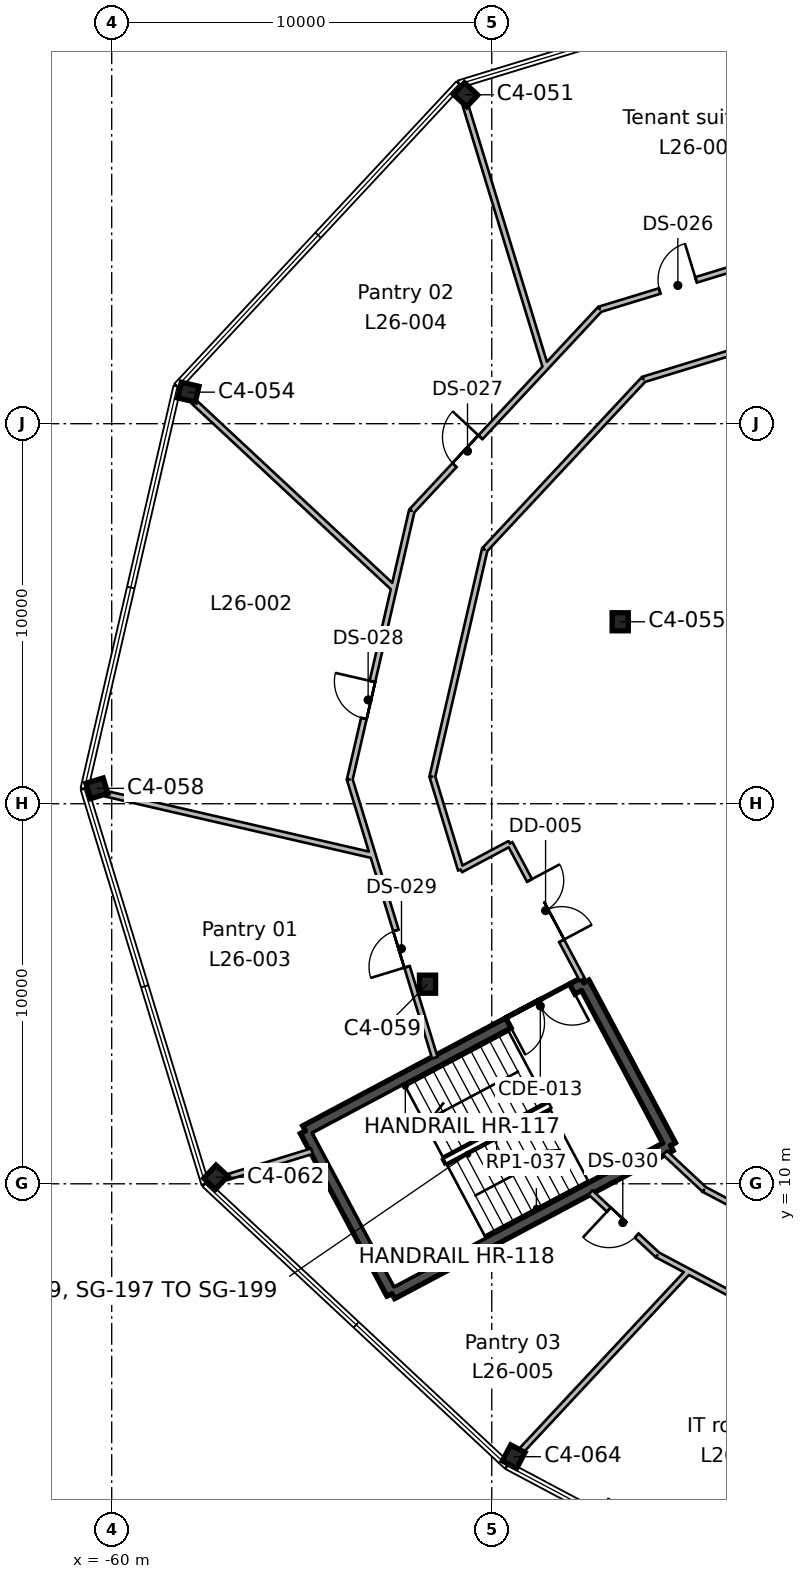
"""IFC4 building model, lengths in metres.
Left out: names, types, materials, properties, quantities, classifications, styles, units other than length and angle.
Written with IfcOpenShell. Run it as: python <this file> out.ifc"""

import sys

from ifc_helpers import new_model, si_unit, direction, frame, frame_2d, origin, origin_2d, place, context, subcontext, project, spatial, rectangle, i_section, extrude, element, fill, save


model = new_model("IFC4")
c1 = context("Model", 3, precision=1e-05, world=origin(), true_north=direction((0.0, 1.0)))
c2 = subcontext(c1, "Body", "Model", "MODEL_VIEW")
j1 = project(units=[si_unit("LENGTHUNIT", "METRE"), si_unit("PLANEANGLEUNIT", "RADIAN")], contexts=[c1])
p1 = place(None, origin())
s1 = spatial("IfcSite", under=j1, at=p1, CompositionType="ELEMENT")
p2 = place(p1, origin())
s2 = spatial("IfcBuilding", under=s1, at=p2, CompositionType="ELEMENT")
p3 = place(p2, frame((0.0, 0.0, 130.2)))
s3 = spatial("IfcBuildingStorey", under=s2, at=p3, CompositionType="ELEMENT", Elevation=130.2)
for number, where, z_axis, x_axis in (
    (1, (-49.423, 2.82, 0.0), (0.0, 0.0, 1.0), (0.883, -0.469, 0.0)),
    (2, (-57.262, 10.173, 0.0), (0.0, 0.0, 1.0), (0.731, -0.682, 0.0)),
    (3, (-51.69, 15.252, 0.0), (0.0, 0.0, 1.0), (1.0, 0.0, 0.0)),
    (4, (-60.39, 20.405, 0.0), (0.0, 0.0, 1.0), (0.292, -0.956, 0.0)),
    (5, (-46.62, 24.788, 0.0), (0.0, 0.0, 1.0), (1.0, 0.0, 0.0)),
    (6, (-57.983, 30.83, 0.0), (0.0, 0.0, 1.0), (-0.225, -0.974, 0.0)),
    (7, (-50.686, 38.655, 0.0), (0.0, 0.0, 1.0), (-0.682, -0.731, 0.0)),
):
    element("IfcColumn", number, at=place(p3, frame(where, z_axis=z_axis, x_axis=x_axis)), inside=s3, PredefinedType="COLUMN", context=c2, shape_type="SweptSolid", body=[
        extrude(i_section(OverallWidth=0.424, OverallDepth=0.475, WebThickness=0.048, FlangeThickness=0.077, FilletRadius=0.015, at=origin_2d()), origin(), (0.0, 0.0, 1.0), 4.0),
    ])
p4 = place(p3, frame((-47.574, 15.29, 0.0), z_axis=(0.0, 0.0, 1.0), x_axis=(0.469443498566, -0.882962514297, 0.0)))
e8 = element("IfcWall", 8, at=p4, inside=s3, PredefinedType="SHEAR", context=c2, shape_type="SweptSolid", body=[
    extrude(rectangle(XDim=4.85, YDim=0.3, at=frame_2d((2.425, 0.0))), origin(), (0.0, 0.0, 1.0), 4.0),
])
p5 = place(p3, frame((-45.297, 11.007, 0.0), z_axis=(0.0, 0.0, 1.0), x_axis=(-0.882951519127, -0.469464178475, 0.0)))
e9 = element("IfcWall", 9, at=p5, inside=s3, PredefinedType="SHEAR", context=c2, shape_type="SweptSolid", body=[
    extrude(rectangle(XDim=8.3, YDim=0.3, at=frame_2d((4.15, 0.0))), origin(), (0.0, 0.0, 1.0), 4.0),
])
p6 = place(p3, frame((-52.626, 7.111, 0.0), z_axis=(0.0, 0.0, 1.0), x_axis=(-0.469464364128, 0.882951420416, 0.0)))
e10 = element("IfcWall", 10, at=p6, inside=s3, PredefinedType="SHEAR", context=c2, shape_type="SweptSolid", body=[
    extrude(rectangle(XDim=4.85, YDim=0.3, at=frame_2d((2.425, 0.0))), origin(), (0.0, 0.0, 1.0), 4.0),
])
p7 = place(p3, frame((-54.903, 11.393, 0.0), z_axis=(0.0, 0.0, 1.0), x_axis=(0.882939326045, 0.469487110071, 0.0)))
e11 = element("IfcWall", 11, at=p7, inside=s3, PredefinedType="SHEAR", context=c2, shape_type="SweptSolid", body=[
    extrude(rectangle(XDim=8.3, YDim=0.3, at=frame_2d((4.15, 0.0))), origin(), (0.0, 0.0, 1.0), 4.0),
])
p8 = place(p7, frame((6.05, 0.0, 0.0)))
e12 = element("IfcOpeningElement", 12, at=p8, cuts=e11, PredefinedType="OPENING", context=c2, shape_type="SweptSolid", body=[
    extrude(rectangle(XDim=1.9, YDim=2.1, at=frame_2d((0.95, 1.05))), frame((0.0, 0.16, 0.0), z_axis=(0.0, -1.0, 0.0), x_axis=(1.0, 0.0, 0.0)), (0.0, 0.0, 1.0), 0.32),
])
p9 = place(p3, frame((-53.125, 18.64, 0.0), z_axis=(0.0, 0.0, 1.0), x_axis=(-0.974351745411, 0.225030389536, 0.0)))
e13 = element("IfcWall", 13, at=p9, inside=s3, PredefinedType="PARTITIONING", context=c2, shape_type="SweptSolid", body=[
    extrude(rectangle(XDim=7.199, YDim=0.15, at=frame_2d((3.6, 0.0))), origin(), (0.0, 0.0, 1.0), 3.64),
])
p10 = place(p3, frame((-57.841, 30.58, 0.0), z_axis=(0.0, 0.0, 1.0), x_axis=(0.73138888014, -0.681960633767, 0.0)))
e14 = element("IfcWall", 14, at=p10, inside=s3, PredefinedType="PARTITIONING", context=c2, shape_type="SweptSolid", body=[
    extrude(rectangle(XDim=7.201, YDim=0.15, at=frame_2d((3.601, 0.0))), origin(), (0.0, 0.0, 1.0), 3.64),
])
p11 = place(p3, frame((-54.732, 10.857, 0.0), z_axis=(0.0, 0.0, 1.0), x_axis=(-0.956196980242, -0.292723991119, 0.0)))
e15 = element("IfcWall", 15, at=p11, inside=s3, PredefinedType="PARTITIONING", context=c2, shape_type="SweptSolid", body=[
    extrude(rectangle(XDim=2.344, YDim=0.15, at=frame_2d((1.172, 0.0))), origin(), (0.0, 0.0, 1.0), 3.64),
])
p12 = place(p3, frame((-52.769, 24.826, 0.0), z_axis=(0.0, 0.0, 1.0), x_axis=(-0.224938307653, -0.974373007503, 0.0)))
e16 = element("IfcWall", 16, at=p12, inside=s3, PredefinedType="PARTITIONING", context=c2, shape_type="SweptSolid", body=[
    extrude(rectangle(XDim=4.299, YDim=0.15, at=frame_2d((2.149, 0.0))), origin(), (0.0, 0.0, 1.0), 3.64),
])
p13 = place(p12, frame((1.65, 0.0, 0.0)))
e17 = element("IfcOpeningElement", 17, at=p13, cuts=e16, PredefinedType="OPENING", context=c2, shape_type="SweptSolid", body=[
    extrude(rectangle(XDim=1.0, YDim=2.1, at=frame_2d((0.5, 1.05))), frame((0.0, 0.085, 0.0), z_axis=(0.0, -1.0, 0.0), x_axis=(1.0, 0.0, 0.0)), (0.0, 0.0, 1.0), 0.17),
])
p14 = place(p3, frame((-53.736, 20.637, 0.0), z_axis=(0.0, 0.0, 1.0), x_axis=(0.292570604626, -0.956243923541, 0.0)))
e18 = element("IfcWall", 18, at=p14, inside=s3, PredefinedType="PARTITIONING", context=c2, shape_type="SweptSolid", body=[
    extrude(rectangle(XDim=2.061, YDim=0.15, at=frame_2d((1.031, 0.0))), origin(), (0.0, 0.0, 1.0), 3.64),
])
p15 = place(p3, frame((-51.498, 13.318, 0.0), z_axis=(0.0, 0.0, 1.0), x_axis=(-0.292370483919, 0.956305129199, 0.0)))
e19 = element("IfcWall", 19, at=p15, inside=s3, PredefinedType="PARTITIONING", context=c2, shape_type="SweptSolid", body=[
    extrude(rectangle(XDim=5.592, YDim=0.15, at=frame_2d((2.796, 0.0))), origin(), (0.0, 0.0, 1.0), 3.64),
])
p16 = place(p15, frame((2.5, 0.0, 0.0)))
e20 = element("IfcOpeningElement", 20, at=p16, cuts=e19, PredefinedType="OPENING", context=c2, shape_type="SweptSolid", body=[
    extrude(rectangle(XDim=1.0, YDim=2.1, at=frame_2d((0.5, 1.05))), frame((0.0, 0.085, 0.0), z_axis=(0.0, -1.0, 0.0), x_axis=(1.0, 0.0, 0.0)), (0.0, 0.0, 1.0), 0.17),
])
p17 = place(p3, frame((-52.769, 24.826, 0.0), z_axis=(0.0, 0.0, 1.0), x_axis=(0.224999270749, 0.974358931894, 0.0)))
e21 = element("IfcWall", 21, at=p17, inside=s3, PredefinedType="PARTITIONING", context=c2, shape_type="SweptSolid", body=[
    extrude(rectangle(XDim=0.893, YDim=0.15, at=frame_2d((0.447, 0.0))), origin(), (0.0, 0.0, 1.0), 3.64),
])
p18 = place(p3, frame((-52.104, 27.705, 0.0), z_axis=(0.0, 0.0, 1.0), x_axis=(-0.225084333606, -0.974339285242, 0.0)))
e22 = element("IfcWall", 22, at=p18, inside=s3, PredefinedType="PARTITIONING", context=c2, shape_type="SweptSolid", body=[
    extrude(rectangle(XDim=2.062, YDim=0.15, at=frame_2d((1.031, 0.0))), origin(), (0.0, 0.0, 1.0), 3.64),
])
p19 = place(p3, frame((-52.104, 27.704, 0.0), z_axis=(0.0, 0.0, 1.0), x_axis=(0.681907306721, 0.731438599638, 0.0)))
e23 = element("IfcWall", 23, at=p19, inside=s3, PredefinedType="PARTITIONING", context=c2, shape_type="SweptSolid", body=[
    extrude(rectangle(XDim=4.298, YDim=0.15, at=frame_2d((2.149, 0.0))), origin(), (0.0, 0.0, 1.0), 3.64),
])
p20 = place(p19, frame((1.65, 0.0, 0.0)))
e24 = element("IfcOpeningElement", 24, at=p20, cuts=e23, PredefinedType="OPENING", context=c2, shape_type="SweptSolid", body=[
    extrude(rectangle(XDim=1.0, YDim=2.1, at=frame_2d((0.5, 1.05))), frame((0.0, 0.085, 0.0), z_axis=(0.0, -1.0, 0.0), x_axis=(1.0, 0.0, 0.0)), (0.0, 0.0, 1.0), 0.17),
])
p21 = place(p3, frame((-50.688, 38.366, 0.0), z_axis=(0.0, 0.0, 1.0), x_axis=(0.292536448014, -0.956254373367, 0.0)))
e25 = element("IfcWall", 25, at=p21, inside=s3, PredefinedType="PARTITIONING", context=c2, shape_type="SweptSolid", body=[
    extrude(rectangle(XDim=7.199, YDim=0.15, at=frame_2d((3.6, 0.0))), origin(), (0.0, 0.0, 1.0), 3.64),
])
p22 = place(p3, frame((-44.826, 7.695, 0.0), z_axis=(0.0, 0.0, 1.0), x_axis=(-0.681994231605, -0.731357551446, 0.0)))
e26 = element("IfcWall", 26, at=p22, inside=s3, PredefinedType="PARTITIONING", context=c2, shape_type="SweptSolid", body=[
    extrude(rectangle(XDim=6.444, YDim=0.15, at=frame_2d((3.222, 0.0))), origin(), (0.0, 0.0, 1.0), 3.64),
])
p23 = place(p3, frame((-49.173, 30.848, 0.0), z_axis=(0.0, 0.0, 1.0), x_axis=(0.681529523193, 0.73179061829, 0.0)))
e27 = element("IfcWall", 27, at=p23, inside=s3, PredefinedType="PARTITIONING", context=c2, shape_type="SweptSolid", body=[
    extrude(rectangle(XDim=0.894, YDim=0.15, at=frame_2d((0.447, 0.0))), origin(), (0.0, 0.0, 1.0), 3.64),
])
p24 = place(p3, frame((-43.047, 34.266, 0.0), z_axis=(0.0, 0.0, 1.0), x_axis=(-0.95628717933, -0.292429189118, 0.0)))
e28 = element("IfcWall", 28, at=p24, inside=s3, PredefinedType="PARTITIONING", context=c2, shape_type="SweptSolid", body=[
    extrude(rectangle(XDim=4.299, YDim=0.15, at=frame_2d((2.149, 0.0))), origin(), (0.0, 0.0, 1.0), 3.64),
])
p25 = place(p24, frame((1.65, 0.0, 0.0)))
e29 = element("IfcOpeningElement", 29, at=p25, cuts=e28, PredefinedType="OPENING", context=c2, shape_type="SweptSolid", body=[
    extrude(rectangle(XDim=1.0, YDim=2.1, at=frame_2d((0.5, 1.05))), frame((0.0, 0.085, 0.0), z_axis=(0.0, -1.0, 0.0), x_axis=(1.0, 0.0, 0.0)), (0.0, 0.0, 1.0), 0.17),
])
p26 = place(p3, frame((-47.158, 33.009, 0.0), z_axis=(0.0, 0.0, 1.0), x_axis=(-0.682162081417, -0.731200994719, 0.0)))
e30 = element("IfcWall", 30, at=p26, inside=s3, PredefinedType="PARTITIONING", context=c2, shape_type="SweptSolid", body=[
    extrude(rectangle(XDim=2.061, YDim=0.15, at=frame_2d((1.031, 0.0))), origin(), (0.0, 0.0, 1.0), 3.64),
])
p27 = place(p3, frame((-47.621, 15.378, 0.0), z_axis=(0.0, 0.0, 1.0), x_axis=(-0.469542997944, 0.882909606404, 0.0)))
e31 = element("IfcWall", 31, at=p27, inside=s3, PredefinedType="PARTITIONING", context=c2, shape_type="SweptSolid", body=[
    extrude(rectangle(XDim=4.051, YDim=0.15, at=frame_2d((2.025, 0.0))), origin(), (0.0, 0.0, 1.0), 3.64),
])
p28 = place(p27, frame((1.15, 0.0, 0.0)))
e32 = element("IfcOpeningElement", 32, at=p28, cuts=e31, PredefinedType="OPENING", context=c2, shape_type="SweptSolid", body=[
    extrude(rectangle(XDim=1.8, YDim=2.1, at=frame_2d((0.9, 1.05))), frame((0.0, 0.085, 0.0), z_axis=(0.0, -1.0, 0.0), x_axis=(1.0, 0.0, 0.0)), (0.0, 0.0, 1.0), 0.17),
])
p29 = place(p3, frame((-49.523, 18.954, 0.0), z_axis=(0.0, 0.0, 1.0), x_axis=(-0.882657481443, -0.470016776778, 0.0)))
e33 = element("IfcWall", 33, at=p29, inside=s3, PredefinedType="PARTITIONING", context=c2, shape_type="SweptSolid", body=[
    extrude(rectangle(XDim=1.464, YDim=0.15, at=frame_2d((0.732, 0.0))), origin(), (0.0, 0.0, 1.0), 3.64),
])
p30 = place(p3, frame((-50.815, 18.266, 0.0), z_axis=(0.0, 0.0, 1.0), x_axis=(-0.292368834646, 0.956305633429, 0.0)))
e34 = element("IfcWall", 34, at=p30, inside=s3, PredefinedType="PARTITIONING", context=c2, shape_type="SweptSolid", body=[
    extrude(rectangle(XDim=2.559, YDim=0.15, at=frame_2d((1.279, 0.0))), origin(), (0.0, 0.0, 1.0), 3.64),
])
p31 = place(p3, frame((-51.563, 20.713, 0.0), z_axis=(0.0, 0.0, 1.0), x_axis=(0.224853687454, 0.974392538579, 0.0)))
e35 = element("IfcWall", 35, at=p31, inside=s3, PredefinedType="PARTITIONING", context=c2, shape_type="SweptSolid", body=[
    extrude(rectangle(XDim=6.128, YDim=0.15, at=frame_2d((3.064, 0.0))), origin(), (0.0, 0.0, 1.0), 3.64),
])
p32 = place(p3, frame((-50.185, 26.684, 0.0), z_axis=(0.0, 0.0, 1.0), x_axis=(0.682032845108, 0.731321542274, 0.0)))
e36 = element("IfcWall", 36, at=p32, inside=s3, PredefinedType="PARTITIONING", context=c2, shape_type="SweptSolid", body=[
    extrude(rectangle(XDim=6.127, YDim=0.15, at=frame_2d((3.063, 0.0))), origin(), (0.0, 0.0, 1.0), 3.64),
])
p33 = place(p3, frame((-46.006, 31.165, 0.0), z_axis=(0.0, 0.0, 1.0), x_axis=(0.95628752803, 0.292428048816, 0.0)))
e37 = element("IfcWall", 37, at=p33, inside=s3, PredefinedType="PARTITIONING", context=c2, shape_type="SweptSolid", body=[
    extrude(rectangle(XDim=6.128, YDim=0.15, at=frame_2d((3.064, 0.0))), origin(), (0.0, 0.0, 1.0), 3.64),
])
p34 = place(p3, frame((-44.88, 7.724, 0.0), z_axis=(0.0, 0.0, 1.0), x_axis=(-0.883060479617, 0.469259192067, 0.0)))
e38 = element("IfcWall", 38, at=p34, inside=s3, PredefinedType="PARTITIONING", context=c2, shape_type="SweptSolid", body=[
    extrude(rectangle(XDim=0.858, YDim=0.15, at=frame_2d((0.429, 0.0))), origin(), (0.0, 0.0, 1.0), 3.64),
])
p35 = place(p3, frame((-45.638, 8.127, 0.0), z_axis=(0.0, 0.0, 1.0), x_axis=(-0.731136071802, 0.682231664839, 0.0)))
e39 = element("IfcWall", 39, at=p35, inside=s3, PredefinedType="PARTITIONING", context=c2, shape_type="SweptSolid", body=[
    extrude(rectangle(XDim=2.411, YDim=0.15, at=frame_2d((1.206, 0.0))), origin(), (0.0, 0.0, 1.0), 3.64),
])
p36 = place(p35, frame((0.75, 0.0, 0.0)))
e40 = element("IfcOpeningElement", 40, at=p36, cuts=e39, PredefinedType="OPENING", context=c2, shape_type="SweptSolid", body=[
    extrude(rectangle(XDim=1.0, YDim=2.1, at=frame_2d((0.5, 1.05))), frame((0.0, 0.085, 0.0), z_axis=(0.0, -1.0, 0.0), x_axis=(1.0, 0.0, 0.0)), (0.0, 0.0, 1.0), 0.17),
])
p37 = place(p3, frame((-44.408, 9.851, 0.0), z_axis=(0.0, 0.0, 1.0), x_axis=(-0.730813748843, 0.682576929366, 0.0)))
e41 = element("IfcWall", 41, at=p37, inside=s3, PredefinedType="PARTITIONING", context=c2, shape_type="SweptSolid", body=[
    extrude(rectangle(XDim=1.412, YDim=0.15, at=frame_2d((0.706, 0.0))), origin(), (0.0, 0.0, 1.0), 3.64),
])
p38 = place(p3, frame((-13.802, -8.8, 0.0), z_axis=(0.0, 0.0, 1.0), x_axis=(-0.882950330338, 0.4694664143, 0.0)))
e42 = element("IfcWall", 42, at=p38, inside=s3, PredefinedType="PARTITIONING", context=c2, shape_type="SweptSolid", body=[
    extrude(rectangle(XDim=35.198, YDim=0.15, at=frame_2d((17.599, 0.0))), origin(), (0.0, 0.0, 1.0), 3.64),
])
p39 = place(p38, frame((26.55, 0.0, 0.0)))
e43 = element("IfcOpeningElement", 43, at=p39, cuts=e42, PredefinedType="OPENING", context=c2, shape_type="SweptSolid", body=[
    extrude(rectangle(XDim=1.0, YDim=2.1, at=frame_2d((0.5, 1.05))), frame((0.0, 0.085, 0.0), z_axis=(0.0, -1.0, 0.0), x_axis=(1.0, 0.0, 0.0)), (0.0, 0.0, 1.0), 0.17),
])
p40 = place(p38, frame((17.05, 0.0, 0.0)))
e44 = element("IfcOpeningElement", 44, at=p40, cuts=e42, PredefinedType="OPENING", context=c2, shape_type="SweptSolid", body=[
    extrude(rectangle(XDim=1.0, YDim=2.1, at=frame_2d((0.5, 1.05))), frame((0.0, 0.085, 0.0), z_axis=(0.0, -1.0, 0.0), x_axis=(1.0, 0.0, 0.0)), (0.0, 0.0, 1.0), 0.17),
])
p41 = place(p38, frame((9.149, 0.0, 0.0)))
e45 = element("IfcOpeningElement", 45, at=p41, cuts=e42, PredefinedType="OPENING", context=c2, shape_type="SweptSolid", body=[
    extrude(rectangle(XDim=1.0, YDim=2.1, at=frame_2d((0.5, 1.05))), frame((0.0, 0.085, 0.0), z_axis=(0.0, -1.0, 0.0), x_axis=(1.0, 0.0, 0.0)), (0.0, 0.0, 1.0), 0.17),
])
p42 = place(p3, frame((-33.685, 4.15, 0.0), z_axis=(0.0, 0.0, 1.0), x_axis=(-0.882957675396, 0.469452599801, 0.0)))
e46 = element("IfcWall", 46, at=p42, inside=s3, PredefinedType="PARTITIONING", context=c2, shape_type="SweptSolid", body=[
    extrude(rectangle(XDim=12.144, YDim=0.15, at=frame_2d((6.072, 0.0))), origin(), (0.0, 0.0, 1.0), 3.64),
])
p43 = place(p8, frame((1.9, 0.0, 0.0), z_axis=(0.0, 0.0, 1.0), x_axis=(-1.0, 0.0, 0.0)))
e47 = element("IfcDoor", 47, at=p43, inside=s3, OperationType="DOUBLE_DOOR_SINGLE_SWING", PredefinedType="DOOR", context=c2, shape_type="SweptSolid", body=[
    extrude(rectangle(XDim=1.9, YDim=2.1, at=frame_2d((0.95, 1.05))), frame((0.0, 0.025, 0.0), z_axis=(0.0, -1.0, 0.0), x_axis=(1.0, 0.0, 0.0)), (0.0, 0.0, 1.0), 0.05),
])
fill(e12, e47)
p44 = place(p28, frame((1.8, 0.0, 0.0), z_axis=(0.0, 0.0, 1.0), x_axis=(-1.0, 0.0, 0.0)))
e48 = element("IfcDoor", 48, at=p44, inside=s3, OperationType="DOUBLE_DOOR_SINGLE_SWING", PredefinedType="DOOR", context=c2, shape_type="SweptSolid", body=[
    extrude(rectangle(XDim=1.8, YDim=2.1, at=frame_2d((0.9, 1.05))), frame((0.0, 0.025, 0.0), z_axis=(0.0, -1.0, 0.0), x_axis=(1.0, 0.0, 0.0)), (0.0, 0.0, 1.0), 0.05),
])
fill(e32, e48)
p45 = place(p25, frame((1.0, 0.0, 0.0), z_axis=(0.0, 0.0, 1.0), x_axis=(-1.0, 0.0, 0.0)))
e49 = element("IfcDoor", 49, at=p45, inside=s3, OperationType="SINGLE_SWING_RIGHT", PredefinedType="DOOR", context=c2, shape_type="SweptSolid", body=[
    extrude(rectangle(XDim=1.0, YDim=2.1, at=frame_2d((0.5, 1.05))), frame((0.0, 0.025, 0.0), z_axis=(0.0, -1.0, 0.0), x_axis=(1.0, 0.0, 0.0)), (0.0, 0.0, 1.0), 0.05),
])
fill(e29, e49)
p46 = place(p20, origin())
e50 = element("IfcDoor", 50, at=p46, inside=s3, OperationType="SINGLE_SWING_RIGHT", PredefinedType="DOOR", context=c2, shape_type="SweptSolid", body=[
    extrude(rectangle(XDim=1.0, YDim=2.1, at=frame_2d((0.5, 1.05))), frame((0.0, 0.025, 0.0), z_axis=(0.0, -1.0, 0.0), x_axis=(1.0, 0.0, 0.0)), (0.0, 0.0, 1.0), 0.05),
])
fill(e24, e50)
p47 = place(p13, frame((1.0, 0.0, 0.0), z_axis=(0.0, 0.0, 1.0), x_axis=(-1.0, 0.0, 0.0)))
e51 = element("IfcDoor", 51, at=p47, inside=s3, OperationType="SINGLE_SWING_RIGHT", PredefinedType="DOOR", context=c2, shape_type="SweptSolid", body=[
    extrude(rectangle(XDim=1.0, YDim=2.1, at=frame_2d((0.5, 1.05))), frame((0.0, 0.025, 0.0), z_axis=(0.0, -1.0, 0.0), x_axis=(1.0, 0.0, 0.0)), (0.0, 0.0, 1.0), 0.05),
])
fill(e17, e51)
p48 = place(p16, origin())
e52 = element("IfcDoor", 52, at=p48, inside=s3, OperationType="SINGLE_SWING_LEFT", PredefinedType="DOOR", context=c2, shape_type="SweptSolid", body=[
    extrude(rectangle(XDim=1.0, YDim=2.1, at=frame_2d((0.5, 1.05))), frame((0.0, 0.025, 0.0), z_axis=(0.0, -1.0, 0.0), x_axis=(1.0, 0.0, 0.0)), (0.0, 0.0, 1.0), 0.05),
])
fill(e20, e52)
p49 = place(p36, origin())
e53 = element("IfcDoor", 53, at=p49, inside=s3, OperationType="SINGLE_SWING_RIGHT", PredefinedType="DOOR", context=c2, shape_type="SweptSolid", body=[
    extrude(rectangle(XDim=1.0, YDim=2.1, at=frame_2d((0.5, 1.05))), frame((0.0, 0.025, 0.0), z_axis=(0.0, -1.0, 0.0), x_axis=(1.0, 0.0, 0.0)), (0.0, 0.0, 1.0), 0.05),
])
fill(e40, e53)
save(model, sys.argv[1])
